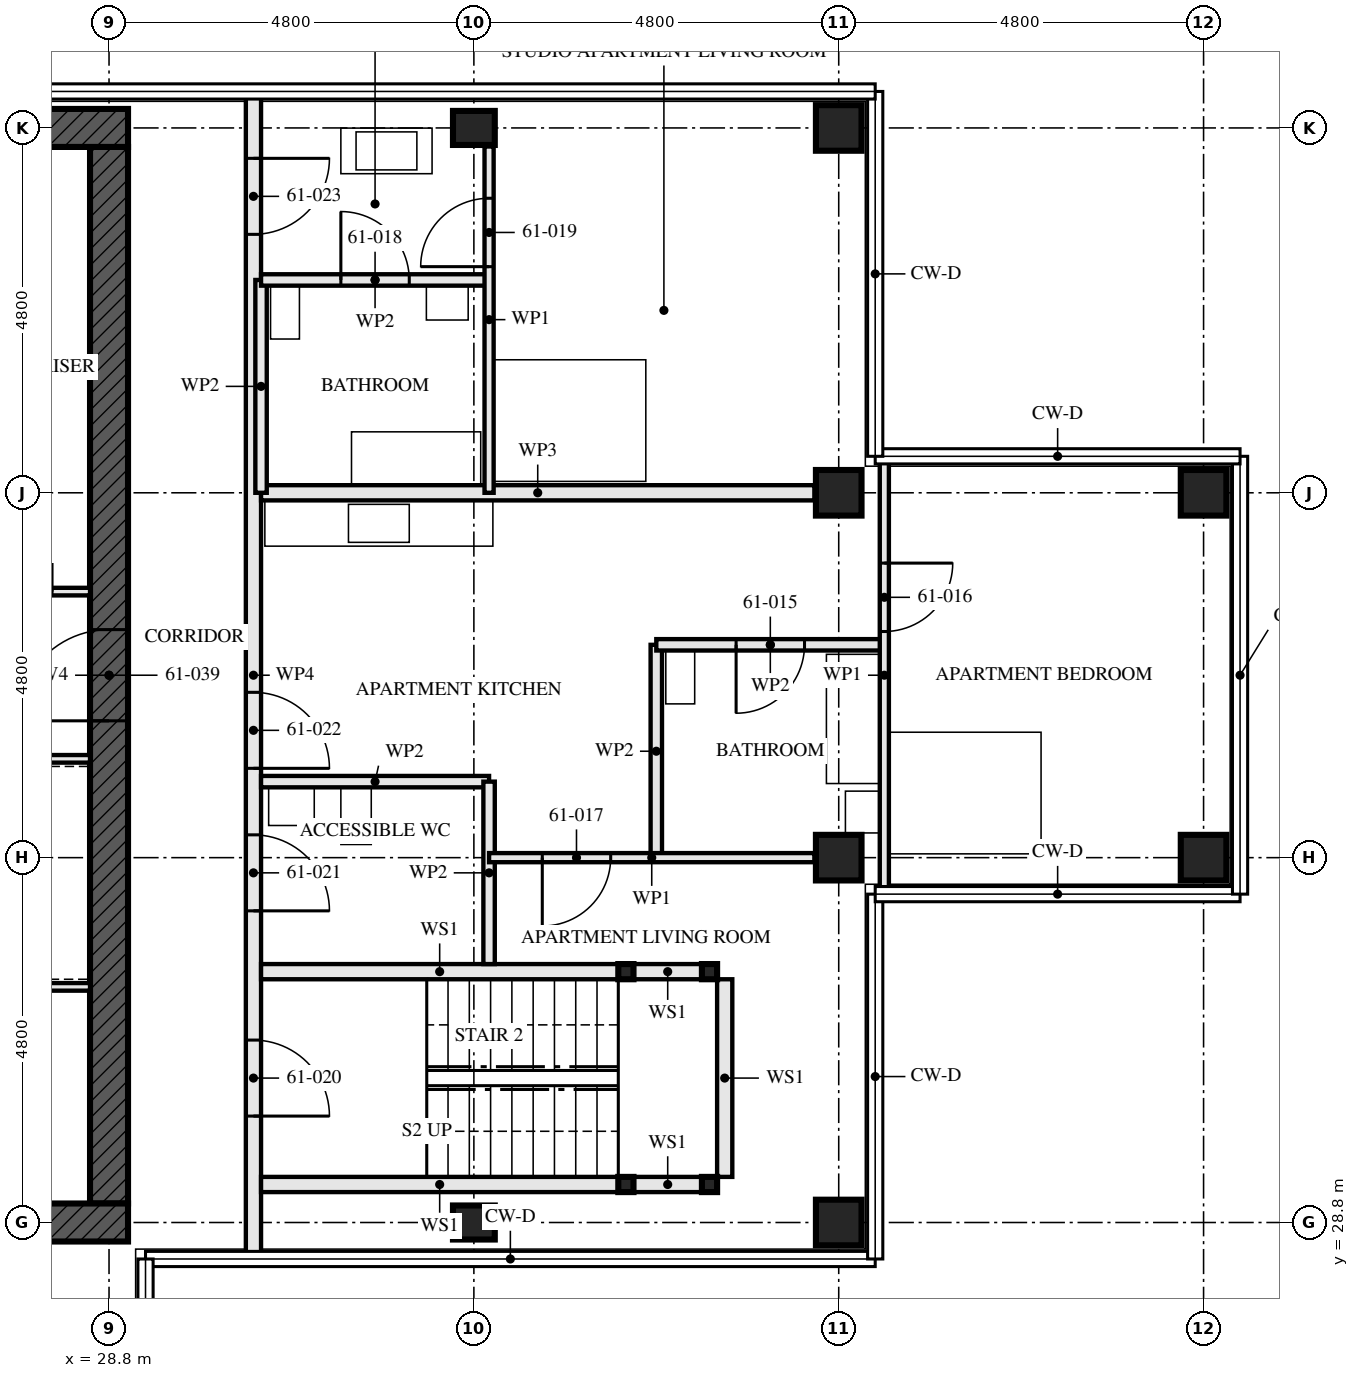
"""IFC4 building model, lengths in metres.
Left out: names, types, materials, properties, quantities, classifications, styles, units other than length and angle.
Written with IfcOpenShell. Run it as: python <this file> out.ifc"""

import sys

from ifc_helpers import new_model, si_unit, direction, frame, frame_2d, origin, origin_2d, place, context, subcontext, project, spatial, rectangle, hollow_rectangle, i_section, extrude, element, fill, save


model = new_model("IFC4")
c1 = context("Model", 3, precision=1e-05, world=origin(), true_north=direction((0.0, 1.0)))
c2 = subcontext(c1, "Body", "Model", "MODEL_VIEW")
j1 = project(units=[si_unit("LENGTHUNIT", "METRE"), si_unit("PLANEANGLEUNIT", "RADIAN")], contexts=[c1])
p1 = place(None, origin())
s1 = spatial("IfcSite", under=j1, at=p1, CompositionType="ELEMENT")
p2 = place(p1, origin())
s2 = spatial("IfcBuilding", under=s1, at=p2, CompositionType="ELEMENT")
p3 = place(p2, frame((0.0, 0.0, 222.5)))
s3 = spatial("IfcBuildingStorey", under=s2, at=p3, CompositionType="ELEMENT", Elevation=222.5)
for number, where, z_axis, x_axis in (
    (1, (33.6, 28.8, 0.0), (0.0, 0.0, 1.0), (0.0, 1.0, 0.0)),
    (2, (33.6, 43.2, 0.0), (0.0, 0.0, 1.0), (0.0, 1.0, 0.0)),
):
    element("IfcColumn", number, at=place(p3, frame(where, z_axis=z_axis, x_axis=x_axis)), inside=s3, PredefinedType="COLUMN", context=c2, shape_type="SweptSolid", body=[
        extrude(i_section(OverallWidth=0.448, OverallDepth=0.55, WebThickness=0.072, FlangeThickness=0.115, FilletRadius=0.015, at=origin_2d()), origin(), (0.0, 0.0, 1.0), 3.5),
    ])
for number, where, z_axis, x_axis in (
    (3, (38.4, 28.8, 0.0), (0.0, 0.0, 1.0), (0.0, 1.0, 0.0)),
    (4, (38.4, 33.6, 0.0), (0.0, 0.0, 1.0), (0.0, 1.0, 0.0)),
    (5, (38.4, 38.4, 0.0), (0.0, 0.0, 1.0), (0.0, 1.0, 0.0)),
    (6, (38.4, 43.2, 0.0), (0.0, 0.0, 1.0), (0.0, 1.0, 0.0)),
    (7, (43.2, 33.6, 0.0), (0.0, 0.0, 1.0), (0.0, 1.0, 0.0)),
    (8, (43.2, 38.4, 0.0), (0.0, 0.0, 1.0), (0.0, 1.0, 0.0)),
):
    element("IfcColumn", number, at=place(p3, frame(where, z_axis=z_axis, x_axis=x_axis)), inside=s3, PredefinedType="COLUMN", context=c2, shape_type="SweptSolid", body=[
        extrude(hollow_rectangle(XDim=0.6, YDim=0.6, WallThickness=0.05, at=origin_2d()), origin(), (0.0, 0.0, 1.0), 3.5),
    ])
p4 = place(p3, frame((14.15, 28.8, -0.17), z_axis=(0.0, 0.0, 1.0), x_axis=(1.0, 0.0, 0.0)))
e9 = element("IfcWall", 9, at=p4, inside=s3, PredefinedType="SHEAR", context=c2, shape_type="SweptSolid", body=[
    extrude(rectangle(XDim=14.9, YDim=0.5, at=frame_2d((7.45, 0.0))), origin(), (0.0, 0.0, 1.0), 3.5),
])
p5 = place(p4, frame((6.85, 0.0, 0.17)))
e10 = element("IfcOpeningElement", 10, at=p5, cuts=e9, PredefinedType="OPENING", context=c2, shape_type="SweptSolid", body=[
    extrude(rectangle(XDim=1.2, YDim=2.1, at=frame_2d((0.6, 1.05))), frame((0.0, 0.26, 0.0), z_axis=(0.0, -1.0, 0.0), x_axis=(1.0, 0.0, 0.0)), (0.0, 0.0, 1.0), 0.521),
])
p6 = place(p3, frame((29.05, 43.2, -0.17), z_axis=(0.0, 0.0, 1.0), x_axis=(-1.0, 0.0, 0.0)))
e11 = element("IfcWall", 11, at=p6, inside=s3, PredefinedType="SHEAR", context=c2, shape_type="SweptSolid", body=[
    extrude(rectangle(XDim=14.9, YDim=0.5, at=frame_2d((7.45, 0.0))), origin(), (0.0, 0.0, 1.0), 3.5),
])
p7 = place(p3, frame((28.8, 29.05, -0.17), z_axis=(0.0, 0.0, 1.0), x_axis=(0.0, 1.0, 0.0)))
e12 = element("IfcWall", 12, at=p7, inside=s3, PredefinedType="SHEAR", context=c2, shape_type="SweptSolid", body=[
    extrude(rectangle(XDim=13.9, YDim=0.5, at=frame_2d((6.95, 0.0))), origin(), (0.0, 0.0, 1.0), 3.5),
])
p8 = place(p7, frame((6.35, 0.0, 0.17)))
e13 = element("IfcOpeningElement", 13, at=p8, cuts=e12, PredefinedType="OPENING", context=c2, shape_type="SweptSolid", body=[
    extrude(rectangle(XDim=1.2, YDim=2.1, at=frame_2d((0.6, 1.05))), frame((0.0, 0.26, 0.0), z_axis=(0.0, -1.0, 0.0), x_axis=(1.0, 0.0, 0.0)), (0.0, 0.0, 1.0), 0.521),
])
for number, where, z_axis, x_axis in (
    (14, (36.7, 29.3, 0.0), (0.0, 0.0, 1.0), (1.0, 0.0, 0.0)),
    (15, (36.7, 32.1, 0.0), (0.0, 0.0, 1.0), (1.0, 0.0, 0.0)),
    (16, (35.6, 29.3, 0.0), (0.0, 0.0, 1.0), (1.0, 0.0, 0.0)),
    (17, (35.6, 32.1, 0.0), (0.0, 0.0, 1.0), (1.0, 0.0, 0.0)),
):
    element("IfcColumn", number, at=place(p3, frame(where, z_axis=z_axis, x_axis=x_axis)), inside=s3, PredefinedType="COLUMN", context=c2, shape_type="SweptSolid", body=[
        extrude(hollow_rectangle(XDim=0.2, YDim=0.2, WallThickness=0.008, at=origin_2d()), origin(), (0.0, 0.0, 1.0), 3.33),
    ])
p9 = place(p3, frame((36.6, 29.3, 0.0), z_axis=(0.0, 0.0, 1.0), x_axis=(-1.0, 0.0, 0.0)))
e18 = element("IfcWall", 18, at=p9, inside=s3, PredefinedType="SOLIDWALL", context=c2, shape_type="SweptSolid", body=[
    extrude(rectangle(XDim=0.9, YDim=0.2, at=frame_2d((0.45, 0.0))), origin(), (0.0, 0.0, 1.0), 2.99),
])
p10 = place(p3, frame((35.5, 29.3, 0.0), z_axis=(0.0, 0.0, 1.0), x_axis=(-1.0, 0.0, 0.0)))
e19 = element("IfcWall", 19, at=p10, inside=s3, PredefinedType="SOLIDWALL", context=c2, shape_type="SweptSolid", body=[
    extrude(rectangle(XDim=4.7, YDim=0.2, at=frame_2d((2.35, 0.0))), origin(), (0.0, 0.0, 1.0), 2.99),
])
p11 = place(p3, frame((36.6, 32.1, 0.0), z_axis=(0.0, 0.0, 1.0), x_axis=(-1.0, 0.0, 0.0)))
e20 = element("IfcWall", 20, at=p11, inside=s3, PredefinedType="SOLIDWALL", context=c2, shape_type="SweptSolid", body=[
    extrude(rectangle(XDim=0.9, YDim=0.2, at=frame_2d((0.45, 0.0))), origin(), (0.0, 0.0, 1.0), 2.99),
])
p12 = place(p3, frame((35.5, 32.1, 0.0), z_axis=(0.0, 0.0, 1.0), x_axis=(-1.0, 0.0, 0.0)))
e21 = element("IfcWall", 21, at=p12, inside=s3, PredefinedType="SOLIDWALL", context=c2, shape_type="SweptSolid", body=[
    extrude(rectangle(XDim=4.7, YDim=0.2, at=frame_2d((2.35, 0.0))), origin(), (0.0, 0.0, 1.0), 2.99),
])
p13 = place(p3, frame((36.9, 29.4, 0.0), z_axis=(0.0, 0.0, 1.0), x_axis=(0.0, 1.0, 0.0)))
e22 = element("IfcWall", 22, at=p13, inside=s3, PredefinedType="SOLIDWALL", context=c2, shape_type="SweptSolid", body=[
    extrude(rectangle(XDim=2.6, YDim=0.2, at=frame_2d((1.3, 0.0))), origin(), (0.0, 0.0, 1.0), 3.33),
])
p14 = place(p3, frame((33.8, 32.2, 0.0), z_axis=(0.0, 0.0, 1.0), x_axis=(0.0, 1.0, 0.0)))
e23 = element("IfcWall", 23, at=p14, inside=s3, PredefinedType="PARTITIONING", context=c2, shape_type="SweptSolid", body=[
    extrude(rectangle(XDim=2.4, YDim=0.15, at=frame_2d((1.2, 0.0))), origin(), (0.0, 0.0, 1.0), 2.55),
])
p15 = place(p3, frame((33.8, 34.6, 0.0), z_axis=(0.0, 0.0, 1.0), x_axis=(-1.0, 0.0, 0.0)))
e24 = element("IfcWall", 24, at=p15, inside=s3, PredefinedType="PARTITIONING", context=c2, shape_type="SweptSolid", body=[
    extrude(rectangle(XDim=3.0, YDim=0.15, at=frame_2d((1.5, 0.0))), origin(), (0.0, 0.0, 1.0), 3.33),
])
p16 = place(p3, frame((39.0, 36.4, 0.0), z_axis=(0.0, 0.0, 1.0), x_axis=(-1.0, 0.0, 0.0)))
e25 = element("IfcWall", 25, at=p16, inside=s3, PredefinedType="PARTITIONING", context=c2, shape_type="SweptSolid", body=[
    extrude(rectangle(XDim=3.0, YDim=0.15, at=frame_2d((1.5, 0.0))), origin(), (0.0, 0.0, 1.0), 3.33),
])
p17 = place(p16, frame((1.05, 0.0, 0.0)))
e26 = element("IfcOpeningElement", 26, at=p17, cuts=e25, PredefinedType="OPENING", context=c2, shape_type="SweptSolid", body=[
    extrude(rectangle(XDim=0.9, YDim=2.1, at=frame_2d((0.45, 1.05))), frame((0.0, 0.085, 0.0), z_axis=(0.0, -1.0, 0.0), x_axis=(1.0, 0.0, 0.0)), (0.0, 0.0, 1.0), 0.171),
])
p18 = place(p3, frame((36.0, 33.6, 0.0), z_axis=(0.0, 0.0, 1.0), x_axis=(0.0, 1.0, 0.0)))
e27 = element("IfcWall", 27, at=p18, inside=s3, PredefinedType="PARTITIONING", context=c2, shape_type="SweptSolid", body=[
    extrude(rectangle(XDim=2.8, YDim=0.15, at=frame_2d((1.4, 0.0))), origin(), (0.0, 0.0, 1.0), 3.33),
])
p19 = place(p3, frame((39.0, 33.145, 0.0), z_axis=(0.0, 0.0, 1.0), x_axis=(0.0, 1.0, 0.0)))
e28 = element("IfcWall", 28, at=p19, inside=s3, PredefinedType="PARTITIONING", context=c2, shape_type="SweptSolid", body=[
    extrude(rectangle(XDim=5.71, YDim=0.12, at=frame_2d((2.855, 0.0))), origin(), (0.0, 0.0, 1.0), 2.32),
])
p20 = place(p19, frame((3.43, 0.0, 0.0)))
e29 = element("IfcOpeningElement", 29, at=p20, cuts=e28, PredefinedType="OPENING", context=c2, shape_type="SweptSolid", body=[
    extrude(rectangle(XDim=0.9, YDim=2.1, at=frame_2d((0.45, 1.05))), frame((0.0, 0.071, 0.0), z_axis=(0.0, -1.0, 0.0), x_axis=(1.0, 0.0, 0.0)), (0.0, 0.0, 1.0), 0.141),
])
p21 = place(p3, frame((38.08, 33.6, 0.0), z_axis=(0.0, 0.0, 1.0), x_axis=(-1.0, 0.0, 0.0)))
e30 = element("IfcWall", 30, at=p21, inside=s3, PredefinedType="PARTITIONING", context=c2, shape_type="SweptSolid", body=[
    extrude(rectangle(XDim=4.28, YDim=0.12, at=frame_2d((2.14, 0.0))), origin(), (0.0, 0.0, 1.0), 2.55),
])
p22 = place(p21, frame((2.68, 0.0, 0.0)))
e31 = element("IfcOpeningElement", 31, at=p22, cuts=e30, PredefinedType="OPENING", context=c2, shape_type="SweptSolid", body=[
    extrude(rectangle(XDim=0.9, YDim=2.1, at=frame_2d((0.45, 1.05))), frame((0.0, 0.071, 0.0), z_axis=(0.0, -1.0, 0.0), x_axis=(1.0, 0.0, 0.0)), (0.0, 0.0, 1.0), 0.141),
])
p23 = place(p3, frame((38.08, 38.4, 0.0), z_axis=(0.0, 0.0, 1.0), x_axis=(-1.0, 0.0, 0.0)))
e32 = element("IfcWall", 32, at=p23, inside=s3, PredefinedType="PARTITIONING", context=c2, shape_type="SweptSolid", body=[
    extrude(rectangle(XDim=7.28, YDim=0.2, at=frame_2d((3.64, 0.0))), origin(), (0.0, 0.0, 1.0), 2.55),
])
p24 = place(p3, frame((33.8, 41.2, 0.0), z_axis=(0.0, 0.0, 1.0), x_axis=(-1.0, 0.0, 0.0)))
e33 = element("IfcWall", 33, at=p24, inside=s3, PredefinedType="PARTITIONING", context=c2, shape_type="SweptSolid", body=[
    extrude(rectangle(XDim=3.0, YDim=0.15, at=frame_2d((1.5, 0.0))), origin(), (0.0, 0.0, 1.0), 3.33),
])
p25 = place(p24, frame((1.05, 0.0, 0.0)))
e34 = element("IfcOpeningElement", 34, at=p25, cuts=e33, PredefinedType="OPENING", context=c2, shape_type="SweptSolid", body=[
    extrude(rectangle(XDim=0.9, YDim=2.1, at=frame_2d((0.45, 1.05))), frame((0.0, 0.085, 0.0), z_axis=(0.0, -1.0, 0.0), x_axis=(1.0, 0.0, 0.0)), (0.0, 0.0, 1.0), 0.171),
])
p26 = place(p3, frame((30.8, 38.4, 0.0), z_axis=(0.0, 0.0, 1.0), x_axis=(0.0, 1.0, 0.0)))
e35 = element("IfcWall", 35, at=p26, inside=s3, PredefinedType="PARTITIONING", context=c2, shape_type="SweptSolid", body=[
    extrude(rectangle(XDim=2.8, YDim=0.15, at=frame_2d((1.4, 0.0))), origin(), (0.0, 0.0, 1.0), 3.33),
])
p27 = place(p3, frame((33.8, 38.4, 0.0), z_axis=(0.0, 0.0, 1.0), x_axis=(0.0, 1.0, 0.0)))
e36 = element("IfcWall", 36, at=p27, inside=s3, PredefinedType="PARTITIONING", context=c2, shape_type="SweptSolid", body=[
    extrude(rectangle(XDim=4.556, YDim=0.12, at=frame_2d((2.278, 0.0))), origin(), (0.0, 0.0, 1.0), 3.33),
])
p28 = place(p27, frame((2.975, 0.0, 0.0)))
e37 = element("IfcOpeningElement", 37, at=p28, cuts=e36, PredefinedType="OPENING", context=c2, shape_type="SweptSolid", body=[
    extrude(rectangle(XDim=0.9, YDim=2.1, at=frame_2d((0.45, 1.05))), frame((0.0, 0.071, 0.0), z_axis=(0.0, -1.0, 0.0), x_axis=(1.0, 0.0, 0.0)), (0.0, 0.0, 1.0), 0.141),
])
p29 = place(p3, frame((30.7, 28.345, 0.0), z_axis=(0.0, 0.0, 1.0), x_axis=(0.0, 1.0, 0.0)))
e38 = element("IfcWall", 38, at=p29, inside=s3, PredefinedType="PARTITIONING", context=c2, shape_type="SweptSolid", body=[
    extrude(rectangle(XDim=15.31, YDim=0.2, at=frame_2d((7.655, 0.0))), origin(), (0.0, 0.0, 1.0), 2.32),
])
p30 = place(p29, frame((1.855, 0.0, 0.0)))
e39 = element("IfcOpeningElement", 39, at=p30, cuts=e38, PredefinedType="OPENING", context=c2, shape_type="SweptSolid", body=[
    extrude(rectangle(XDim=1.0, YDim=2.1, at=frame_2d((0.5, 1.05))), frame((0.0, 0.111, 0.0), z_axis=(0.0, -1.0, 0.0), x_axis=(1.0, 0.0, 0.0)), (0.0, 0.0, 1.0), 0.221),
])
p31 = place(p29, frame((4.555, 0.0, 0.0)))
e40 = element("IfcOpeningElement", 40, at=p31, cuts=e38, PredefinedType="OPENING", context=c2, shape_type="SweptSolid", body=[
    extrude(rectangle(XDim=1.0, YDim=2.1, at=frame_2d((0.5, 1.05))), frame((0.0, 0.111, 0.0), z_axis=(0.0, -1.0, 0.0), x_axis=(1.0, 0.0, 0.0)), (0.0, 0.0, 1.0), 0.221),
])
p32 = place(p29, frame((6.43, 0.0, 0.0)))
e41 = element("IfcOpeningElement", 41, at=p32, cuts=e38, PredefinedType="OPENING", context=c2, shape_type="SweptSolid", body=[
    extrude(rectangle(XDim=1.0, YDim=2.1, at=frame_2d((0.5, 1.05))), frame((0.0, 0.111, 0.0), z_axis=(0.0, -1.0, 0.0), x_axis=(1.0, 0.0, 0.0)), (0.0, 0.0, 1.0), 0.221),
])
p33 = place(p29, frame((13.455, 0.0, 0.0)))
e42 = element("IfcOpeningElement", 42, at=p33, cuts=e38, PredefinedType="OPENING", context=c2, shape_type="SweptSolid", body=[
    extrude(rectangle(XDim=1.0, YDim=2.1, at=frame_2d((0.5, 1.05))), frame((0.0, 0.111, 0.0), z_axis=(0.0, -1.0, 0.0), x_axis=(1.0, 0.0, 0.0)), (0.0, 0.0, 1.0), 0.221),
])
p34 = place(p3, frame((23.05, 34.9, 0.0), z_axis=(0.0, 0.0, 1.0), x_axis=(1.0, 0.0, 0.0)))
e43 = element("IfcWall", 43, at=p34, inside=s3, PredefinedType="SOLIDWALL", context=c2, shape_type="SweptSolid", body=[
    extrude(rectangle(XDim=5.5, YDim=0.1, at=frame_2d((2.75, 0.0))), origin(), (0.0, 0.0, 1.0), 3.33),
])
p35 = place(p34, frame((0.85, 0.0, 0.0)))
e44 = element("IfcOpeningElement", 44, at=p35, cuts=e43, PredefinedType="OPENING", context=c2, shape_type="SweptSolid", body=[
    extrude(rectangle(XDim=1.0, YDim=2.1, at=frame_2d((0.5, 1.05))), frame((0.0, 0.061, 0.0), z_axis=(0.0, -1.0, 0.0), x_axis=(1.0, 0.0, 0.0)), (0.0, 0.0, 1.0), 0.121),
])
p36 = place(p34, frame((3.625, 0.0, 0.0)))
e45 = element("IfcOpeningElement", 45, at=p36, cuts=e43, PredefinedType="OPENING", context=c2, shape_type="SweptSolid", body=[
    extrude(rectangle(XDim=1.0, YDim=2.1, at=frame_2d((0.5, 1.05))), frame((0.0, 0.061, 0.0), z_axis=(0.0, -1.0, 0.0), x_axis=(1.0, 0.0, 0.0)), (0.0, 0.0, 1.0), 0.121),
])
p37 = place(p3, frame((22.65, 37.1, 0.0), z_axis=(0.0, 0.0, 1.0), x_axis=(1.0, 0.0, 0.0)))
e46 = element("IfcWall", 46, at=p37, inside=s3, PredefinedType="SOLIDWALL", context=c2, shape_type="SweptSolid", body=[
    extrude(rectangle(XDim=5.9, YDim=0.1, at=frame_2d((2.95, 0.0))), origin(), (0.0, 0.0, 1.0), 3.33),
])
p38 = place(p37, frame((3.1, 0.0, 0.0)))
e47 = element("IfcOpeningElement", 47, at=p38, cuts=e46, PredefinedType="OPENING", context=c2, shape_type="SweptSolid", body=[
    extrude(rectangle(XDim=0.9, YDim=2.1, at=frame_2d((0.45, 1.05))), frame((0.0, 0.061, 0.0), z_axis=(0.0, -1.0, 0.0), x_axis=(1.0, 0.0, 0.0)), (0.0, 0.0, 1.0), 0.121),
])
p39 = place(p37, frame((4.7, 0.0, 0.0)))
e48 = element("IfcOpeningElement", 48, at=p39, cuts=e46, PredefinedType="OPENING", context=c2, shape_type="SweptSolid", body=[
    extrude(rectangle(XDim=0.7, YDim=2.1, at=frame_2d((0.35, 1.05))), frame((0.0, 0.061, 0.0), z_axis=(0.0, -1.0, 0.0), x_axis=(1.0, 0.0, 0.0)), (0.0, 0.0, 1.0), 0.121),
])
p40 = place(p3, frame((23.15, 31.9, 0.0), z_axis=(0.0, 0.0, 1.0), x_axis=(1.0, 0.0, 0.0)))
e49 = element("IfcWall", 49, at=p40, inside=s3, PredefinedType="SOLIDWALL", context=c2, shape_type="SweptSolid", body=[
    extrude(rectangle(XDim=5.4, YDim=0.1, at=frame_2d((2.7, 0.0))), origin(), (0.0, 0.0, 1.0), 3.33),
])
p41 = place(p17, origin())
e50 = element("IfcDoor", 50, at=p41, inside=s3, OperationType="SINGLE_SWING_LEFT", PredefinedType="DOOR", context=c2, shape_type="SweptSolid", body=[
    extrude(rectangle(XDim=0.9, YDim=2.1, at=frame_2d((0.45, 1.05))), frame((0.0, 0.022, 0.0), z_axis=(0.0, -1.0, 0.0), x_axis=(1.0, 0.0, 0.0)), (0.0, 0.0, 1.0), 0.044),
])
fill(e26, e50)
p42 = place(p20, frame((0.9, 0.0, 0.0), z_axis=(0.0, 0.0, 1.0), x_axis=(-1.0, 0.0, 0.0)))
e51 = element("IfcDoor", 51, at=p42, inside=s3, OperationType="SINGLE_SWING_RIGHT", PredefinedType="DOOR", context=c2, shape_type="SweptSolid", body=[
    extrude(rectangle(XDim=0.9, YDim=2.1, at=frame_2d((0.45, 1.05))), frame((0.0, 0.022, 0.0), z_axis=(0.0, -1.0, 0.0), x_axis=(1.0, 0.0, 0.0)), (0.0, 0.0, 1.0), 0.044),
])
fill(e29, e51)
p43 = place(p22, origin())
e52 = element("IfcDoor", 52, at=p43, inside=s3, OperationType="SINGLE_SWING_LEFT", PredefinedType="DOOR", context=c2, shape_type="SweptSolid", body=[
    extrude(rectangle(XDim=0.9, YDim=2.1, at=frame_2d((0.45, 1.05))), frame((0.0, 0.022, 0.0), z_axis=(0.0, -1.0, 0.0), x_axis=(1.0, 0.0, 0.0)), (0.0, 0.0, 1.0), 0.044),
])
fill(e31, e52)
p44 = place(p25, frame((0.9, 0.0, 0.0), z_axis=(0.0, 0.0, 1.0), x_axis=(-1.0, 0.0, 0.0)))
e53 = element("IfcDoor", 53, at=p44, inside=s3, OperationType="SINGLE_SWING_RIGHT", PredefinedType="DOOR", context=c2, shape_type="SweptSolid", body=[
    extrude(rectangle(XDim=0.9, YDim=2.1, at=frame_2d((0.45, 1.05))), frame((0.0, 0.022, 0.0), z_axis=(0.0, -1.0, 0.0), x_axis=(1.0, 0.0, 0.0)), (0.0, 0.0, 1.0), 0.044),
])
fill(e34, e53)
p45 = place(p28, origin())
e54 = element("IfcDoor", 54, at=p45, inside=s3, OperationType="SINGLE_SWING_RIGHT", PredefinedType="DOOR", context=c2, shape_type="SweptSolid", body=[
    extrude(rectangle(XDim=0.9, YDim=2.1, at=frame_2d((0.45, 1.05))), frame((0.0, 0.022, 0.0), z_axis=(0.0, -1.0, 0.0), x_axis=(1.0, 0.0, 0.0)), (0.0, 0.0, 1.0), 0.044),
])
fill(e37, e54)
p46 = place(p30, frame((1.0, 0.0, 0.0), z_axis=(0.0, 0.0, 1.0), x_axis=(-1.0, 0.0, 0.0)))
e55 = element("IfcDoor", 55, at=p46, inside=s3, OperationType="SINGLE_SWING_LEFT", PredefinedType="DOOR", context=c2, shape_type="SweptSolid", body=[
    extrude(rectangle(XDim=1.0, YDim=2.1, at=frame_2d((0.5, 1.05))), frame((0.0, 0.032, 0.0), z_axis=(0.0, -1.0, 0.0), x_axis=(1.0, 0.0, 0.0)), (0.0, 0.0, 1.0), 0.064),
])
fill(e39, e55)
p47 = place(p31, frame((1.0, 0.0, 0.0), z_axis=(0.0, 0.0, 1.0), x_axis=(-1.0, 0.0, 0.0)))
e56 = element("IfcDoor", 56, at=p47, inside=s3, OperationType="SINGLE_SWING_LEFT", PredefinedType="DOOR", context=c2, shape_type="SweptSolid", body=[
    extrude(rectangle(XDim=1.0, YDim=2.1, at=frame_2d((0.5, 1.05))), frame((0.0, 0.027, 0.0), z_axis=(0.0, -1.0, 0.0), x_axis=(1.0, 0.0, 0.0)), (0.0, 0.0, 1.0), 0.054),
])
fill(e40, e56)
p48 = place(p32, frame((1.0, 0.0, 0.0), z_axis=(0.0, 0.0, 1.0), x_axis=(-1.0, 0.0, 0.0)))
e57 = element("IfcDoor", 57, at=p48, inside=s3, OperationType="SINGLE_SWING_LEFT", PredefinedType="DOOR", context=c2, shape_type="SweptSolid", body=[
    extrude(rectangle(XDim=1.0, YDim=2.1, at=frame_2d((0.5, 1.05))), frame((0.0, 0.027, 0.0), z_axis=(0.0, -1.0, 0.0), x_axis=(1.0, 0.0, 0.0)), (0.0, 0.0, 1.0), 0.054),
])
fill(e41, e57)
p49 = place(p33, frame((1.0, 0.0, 0.0), z_axis=(0.0, 0.0, 1.0), x_axis=(-1.0, 0.0, 0.0)))
e58 = element("IfcDoor", 58, at=p49, inside=s3, OperationType="SINGLE_SWING_RIGHT", PredefinedType="DOOR", context=c2, shape_type="SweptSolid", body=[
    extrude(rectangle(XDim=1.0, YDim=2.1, at=frame_2d((0.5, 1.05))), frame((0.0, 0.027, 0.0), z_axis=(0.0, -1.0, 0.0), x_axis=(1.0, 0.0, 0.0)), (0.0, 0.0, 1.0), 0.054),
])
fill(e42, e58)
p50 = place(p8, origin())
e59 = element("IfcDoor", 59, at=p50, inside=s3, OperationType="SINGLE_SWING_LEFT", PredefinedType="DOOR", context=c2, shape_type="SweptSolid", body=[
    extrude(rectangle(XDim=1.2, YDim=2.1, at=frame_2d((0.6, 1.05))), frame((0.0, 0.027, 0.0), z_axis=(0.0, -1.0, 0.0), x_axis=(1.0, 0.0, 0.0)), (0.0, 0.0, 1.0), 0.054),
])
fill(e13, e59)
save(model, sys.argv[1])
